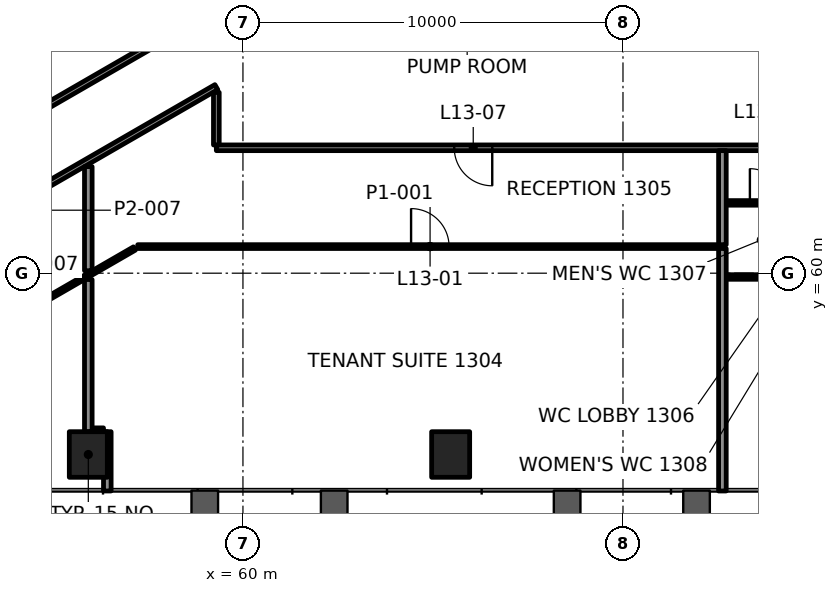
"""IFC4 building model, lengths in metres.
Left out: names, types, materials, properties, quantities, classifications, styles, units other than length and angle.
Written with IfcOpenShell. Run it as: python <this file> out.ifc"""

import sys

from ifc_helpers import new_model, si_unit, direction, frame, frame_2d, origin, origin_2d, place, context, subcontext, project, spatial, rectangle, extrude, element, fill, save


model = new_model("IFC4")
c1 = context("Model", 3, precision=1e-05, world=origin(), true_north=direction((0.0, 1.0)))
c2 = subcontext(c1, "Body", "Model", "MODEL_VIEW")
j1 = project(units=[si_unit("LENGTHUNIT", "METRE"), si_unit("PLANEANGLEUNIT", "RADIAN")], contexts=[c1])
p1 = place(None, origin())
s1 = spatial("IfcSite", under=j1, at=p1, CompositionType="ELEMENT")
p2 = place(p1, origin())
s2 = spatial("IfcBuilding", under=s1, at=p2, CompositionType="ELEMENT")
p3 = place(p2, frame((0.0, 0.0, 61.0)))
s3 = spatial("IfcBuildingStorey", under=s2, at=p3, CompositionType="ELEMENT", Elevation=61.0)
for number, where, z_axis, x_axis in (
    (1, (55.931, 55.229, -0.0), (0.0, 0.0, 1.0), (1.0, 0.0, 0.0)),
    (2, (65.466, 55.229, -0.0), (0.0, 0.0, 1.0), (1.0, 0.0, 0.0)),
):
    element("IfcColumn", number, at=place(p3, frame(where, z_axis=z_axis, x_axis=x_axis)), inside=s3, PredefinedType="COLUMN", context=c2, shape_type="SweptSolid", body=[
        extrude(rectangle(XDim=1.0, YDim=1.2, at=origin_2d()), origin(), (0.0, 0.0, 1.0), 4.2),
    ])
p4 = place(p3, frame((56.031, 55.829, 0.0), z_axis=(0.0, 0.0, 1.0), x_axis=(1.0, 0.0, 0.0)))
e3 = element("IfcWall", 3, at=p4, inside=s3, PredefinedType="PARTITIONING", context=c2, shape_type="SweptSolid", body=[
    extrude(rectangle(XDim=0.3, YDim=0.2, at=frame_2d((0.15, 0.0))), origin(), (0.0, 0.0, 1.0), 3.4),
])
p5 = place(p3, frame((72.717, 59.9, 0.0), z_axis=(0.0, 0.0, 1.0), x_axis=(1.0, 0.0, 0.0)))
e4 = element("IfcWall", 4, at=p5, inside=s3, PredefinedType="PARTITIONING", context=c2, shape_type="SweptSolid", body=[
    extrude(rectangle(XDim=7.05, YDim=0.12, at=frame_2d((3.525, 0.0))), origin(), (0.0, 0.0, 1.0), 3.4),
])
p6 = place(p3, frame((57.232, 60.7, 0.0), z_axis=(0.0, 0.0, 1.0), x_axis=(1.0, 0.0, 0.0)))
e5 = element("IfcWall", 5, at=p6, inside=s3, PredefinedType="PARTITIONING", context=c2, shape_type="SweptSolid", body=[
    extrude(rectangle(XDim=15.385, YDim=0.1, at=frame_2d((7.692, 0.0))), origin(), (0.0, 0.0, 1.0), 3.4),
])
p7 = place(p6, frame((7.192, 0.0, 0.0)))
e6 = element("IfcOpeningElement", 6, at=p7, cuts=e5, PredefinedType="OPENING", context=c2, shape_type="SweptSolid", body=[
    extrude(rectangle(XDim=1.0, YDim=2.1, at=frame_2d((0.5, 1.05))), frame((0.0, 0.06, 0.0), z_axis=(0.0, -1.0, 0.0), x_axis=(1.0, 0.0, 0.0)), (0.0, 0.0, 1.0), 0.12),
])
p8 = place(p3, frame((72.716, 61.85, 0.0), z_axis=(0.0, 0.0, 1.0), x_axis=(1.0, 0.0, 0.0)))
e7 = element("IfcWall", 7, at=p8, inside=s3, PredefinedType="PARTITIONING", context=c2, shape_type="SweptSolid", body=[
    extrude(rectangle(XDim=7.051, YDim=0.12, at=frame_2d((3.525, 0.0))), origin(), (0.0, 0.0, 1.0), 3.4),
])
p9 = place(p8, frame((0.623, 0.0, 0.0)))
e8 = element("IfcOpeningElement", 8, at=p9, cuts=e7, PredefinedType="OPENING", context=c2, shape_type="SweptSolid", body=[
    extrude(rectangle(XDim=0.9, YDim=2.1, at=frame_2d((0.45, 1.05))), frame((0.0, 0.07, 0.0), z_axis=(0.0, -1.0, 0.0), x_axis=(1.0, 0.0, 0.0)), (0.0, 0.0, 1.0), 0.14),
])
p10 = place(p8, frame((2.515, 0.0, 0.0)))
e9 = element("IfcOpeningElement", 9, at=p10, cuts=e7, PredefinedType="OPENING", context=c2, shape_type="SweptSolid", body=[
    extrude(rectangle(XDim=0.9, YDim=2.1, at=frame_2d((0.45, 1.05))), frame((0.0, 0.07, 0.0), z_axis=(0.0, -1.0, 0.0), x_axis=(1.0, 0.0, 0.0)), (0.0, 0.0, 1.0), 0.14),
])
p11 = place(p8, frame((4.917, 0.0, 0.0)))
e10 = element("IfcOpeningElement", 10, at=p11, cuts=e7, PredefinedType="OPENING", context=c2, shape_type="SweptSolid", body=[
    extrude(rectangle(XDim=1.0, YDim=2.1, at=frame_2d((0.5, 1.05))), frame((0.0, 0.07, 0.0), z_axis=(0.0, -1.0, 0.0), x_axis=(1.0, 0.0, 0.0)), (0.0, 0.0, 1.0), 0.14),
])
p12 = place(p3, frame((90.699, 63.3, 0.0), z_axis=(0.0, 0.0, 1.0), x_axis=(-1.0, 0.0, 0.0)))
e11 = element("IfcWall", 11, at=p12, inside=s3, PredefinedType="PARTITIONING", context=c2, shape_type="SweptSolid", body=[
    extrude(rectangle(XDim=31.399, YDim=0.15, at=frame_2d((15.7, 0.0))), origin(), (0.0, 0.0, 1.0), 3.4),
])
p13 = place(p12, frame((4.968, 0.0, 0.0)))
e12 = element("IfcOpeningElement", 12, at=p13, cuts=e11, PredefinedType="OPENING", context=c2, shape_type="SweptSolid", body=[
    extrude(rectangle(XDim=1.2, YDim=2.1, at=frame_2d((0.6, 1.05))), frame((0.0, 0.085, 0.0), z_axis=(0.0, -1.0, 0.0), x_axis=(1.0, 0.0, 0.0)), (0.0, 0.0, 1.0), 0.17),
])
p14 = place(p12, frame((13.908, 0.0, 0.0)))
e13 = element("IfcOpeningElement", 13, at=p14, cuts=e11, PredefinedType="OPENING", context=c2, shape_type="SweptSolid", body=[
    extrude(rectangle(XDim=1.2, YDim=2.1, at=frame_2d((0.6, 1.05))), frame((0.0, 0.085, 0.0), z_axis=(0.0, -1.0, 0.0), x_axis=(1.0, 0.0, 0.0)), (0.0, 0.0, 1.0), 0.17),
])
p15 = place(p12, frame((24.14, 0.0, 0.0)))
e14 = element("IfcOpeningElement", 14, at=p15, cuts=e11, PredefinedType="OPENING", context=c2, shape_type="SweptSolid", body=[
    extrude(rectangle(XDim=1.0, YDim=2.1, at=frame_2d((0.5, 1.05))), frame((0.0, 0.085, 0.0), z_axis=(0.0, -1.0, 0.0), x_axis=(1.0, 0.0, 0.0)), (0.0, 0.0, 1.0), 0.17),
])
p16 = place(p3, frame((50.819, 56.998, 0.0), z_axis=(0.0, 0.0, 1.0), x_axis=(0.866023631393, 0.50000306986, 0.0)))
e15 = element("IfcWall", 15, at=p16, inside=s3, PredefinedType="PARTITIONING", context=c2, shape_type="SweptSolid", body=[
    extrude(rectangle(XDim=7.305, YDim=0.1, at=frame_2d((3.653, 0.0))), origin(), (0.0, 0.0, 1.0), 3.4),
])
p17 = place(p16, frame((2.602, 0.0, 0.0)))
e16 = element("IfcOpeningElement", 16, at=p17, cuts=e15, PredefinedType="OPENING", context=c2, shape_type="SweptSolid", body=[
    extrude(rectangle(XDim=0.9, YDim=2.1, at=frame_2d((0.45, 1.05))), frame((0.0, 0.06, 0.0), z_axis=(0.0, -1.0, 0.0), x_axis=(1.0, 0.0, 0.0)), (0.0, 0.0, 1.0), 0.12),
])
p18 = place(p3, frame((59.3, 64.896, 0.0), z_axis=(0.0, 0.0, 1.0), x_axis=(-0.86602302899, -0.500004113243, 0.0)))
e17 = element("IfcWall", 17, at=p18, inside=s3, PredefinedType="PARTITIONING", context=c2, shape_type="SweptSolid", body=[
    extrude(rectangle(XDim=12.956, YDim=0.15, at=frame_2d((6.478, 0.0))), origin(), (0.0, 0.0, 1.0), 3.247),
])
p19 = place(p18, frame((7.821, 0.0, 0.0)))
e18 = element("IfcOpeningElement", 18, at=p19, cuts=e17, PredefinedType="OPENING", context=c2, shape_type="SweptSolid", body=[
    extrude(rectangle(XDim=1.0, YDim=2.1, at=frame_2d((0.5, 1.05))), frame((0.0, 0.085, 0.0), z_axis=(0.0, -1.0, 0.0), x_axis=(1.0, 0.0, 0.0)), (0.0, 0.0, 1.0), 0.17),
])
p20 = place(p3, frame((47.178, 59.976, 0.0), z_axis=(0.0, 0.0, 1.0), x_axis=(0.866019280802, 0.500010605167, 0.0)))
e19 = element("IfcWall", 19, at=p20, inside=s3, PredefinedType="PARTITIONING", context=c2, shape_type="SweptSolid", body=[
    extrude(rectangle(XDim=13.91, YDim=0.15, at=frame_2d((6.955, 0.0))), origin(), (0.0, 0.0, 1.0), 3.4),
])
p21 = place(p20, frame((6.455, 0.0, 0.0)))
e20 = element("IfcOpeningElement", 20, at=p21, cuts=e19, PredefinedType="OPENING", context=c2, shape_type="SweptSolid", body=[
    extrude(rectangle(XDim=1.0, YDim=2.1, at=frame_2d((0.5, 1.05))), frame((0.0, 0.085, 0.0), z_axis=(0.0, -1.0, 0.0), x_axis=(1.0, 0.0, 0.0)), (0.0, 0.0, 1.0), 0.17),
])
p22 = place(p3, frame((56.7, 68.476, 0.0), z_axis=(0.0, 0.0, 1.0), x_axis=(-0.866026152489, -0.499998703203, 0.0)))
e21 = element("IfcWall", 21, at=p22, inside=s3, PredefinedType="PARTITIONING", context=c2, shape_type="SweptSolid", body=[
    extrude(rectangle(XDim=15.096, YDim=0.1, at=frame_2d((7.548, 0.0))), origin(), (0.0, 0.0, 1.0), 3.4),
])
p23 = place(p22, frame((6.948, 0.0, 0.0)))
e22 = element("IfcOpeningElement", 22, at=p23, cuts=e21, PredefinedType="OPENING", context=c2, shape_type="SweptSolid", body=[
    extrude(rectangle(XDim=1.2, YDim=2.1, at=frame_2d((0.6, 1.05))), frame((0.0, 0.06, 0.0), z_axis=(0.0, -1.0, 0.0), x_axis=(1.0, 0.0, 0.0)), (0.0, 0.0, 1.0), 0.12),
])
p24 = place(p3, frame((72.616, 54.269, 0.0), z_axis=(0.0, 0.0, 1.0), x_axis=(0.0, 1.0, 0.0)))
e23 = element("IfcWall", 23, at=p24, inside=s3, PredefinedType="PARTITIONING", context=c2, shape_type="SweptSolid", body=[
    extrude(rectangle(XDim=6.381, YDim=0.2, at=frame_2d((3.19, 0.0))), origin(), (0.0, 0.0, 1.0), 3.165),
])
p25 = place(p3, frame((59.3, 63.375, 0.0), z_axis=(0.0, 0.0, 1.0), x_axis=(0.0, 1.0, 0.0)))
e24 = element("IfcWall", 24, at=p25, inside=s3, PredefinedType="PARTITIONING", context=c2, shape_type="SweptSolid", body=[
    extrude(rectangle(XDim=1.385, YDim=0.15, at=frame_2d((0.692, 0.0))), origin(), (0.0, 0.0, 1.0), 3.247),
])
p26 = place(p3, frame((56.431, 54.269, 0.0), z_axis=(0.0, 0.0, 1.0), x_axis=(0.0, 1.0, 0.0)))
e25 = element("IfcWall", 25, at=p26, inside=s3, PredefinedType="PARTITIONING", context=c2, shape_type="SweptSolid", body=[
    extrude(rectangle(XDim=1.56, YDim=0.2, at=frame_2d((0.78, 0.0))), origin(), (0.0, 0.0, 1.0), 3.165),
])
p27 = place(p3, frame((55.931, 55.829, 0.0), z_axis=(0.0, 0.0, 1.0), x_axis=(0.0, 1.0, 0.0)))
e26 = element("IfcWall", 26, at=p27, inside=s3, PredefinedType="PARTITIONING", context=c2, shape_type="SweptSolid", body=[
    extrude(rectangle(XDim=4.005, YDim=0.2, at=frame_2d((2.002, 0.0))), origin(), (0.0, 0.0, 1.0), 3.4),
])
p28 = place(p3, frame((72.616, 60.75, 0.0), z_axis=(0.0, 0.0, 1.0), x_axis=(0.0, 1.0, 0.0)))
e27 = element("IfcWall", 27, at=p28, inside=s3, PredefinedType="PARTITIONING", context=c2, shape_type="SweptSolid", body=[
    extrude(rectangle(XDim=2.475, YDim=0.2, at=frame_2d((1.238, 0.0))), origin(), (0.0, 0.0, 1.0), 3.4),
])
p29 = place(p3, frame((55.931, 60.065, 0.0), z_axis=(0.0, 0.0, 1.0), x_axis=(0.0, 1.0, 0.0)))
e28 = element("IfcWall", 28, at=p29, inside=s3, PredefinedType="PARTITIONING", context=c2, shape_type="SweptSolid", body=[
    extrude(rectangle(XDim=2.74, YDim=0.2, at=frame_2d((1.37, 0.0))), origin(), (0.0, 0.0, 1.0), 3.4),
])
p30 = place(p7, origin())
e29 = element("IfcDoor", 29, at=p30, inside=s3, OperationType="SINGLE_SWING_LEFT", PredefinedType="DOOR", context=c2, shape_type="SweptSolid", body=[
    extrude(rectangle(XDim=1.0, YDim=2.1, at=frame_2d((0.5, 1.05))), frame((0.0, 0.025, 0.0), z_axis=(0.0, -1.0, 0.0), x_axis=(1.0, 0.0, 0.0)), (0.0, 0.0, 1.0), 0.05),
])
fill(e6, e29)
p31 = place(p9, origin())
e30 = element("IfcDoor", 30, at=p31, inside=s3, OperationType="SINGLE_SWING_RIGHT", PredefinedType="DOOR", context=c2, shape_type="SweptSolid", body=[
    extrude(rectangle(XDim=0.9, YDim=2.1, at=frame_2d((0.45, 1.05))), frame((0.0, 0.025, 0.0), z_axis=(0.0, -1.0, 0.0), x_axis=(1.0, 0.0, 0.0)), (0.0, 0.0, 1.0), 0.05),
])
fill(e8, e30)
p32 = place(p15, origin())
e31 = element("IfcDoor", 31, at=p32, inside=s3, OperationType="SINGLE_SWING_LEFT", PredefinedType="DOOR", context=c2, shape_type="SweptSolid", body=[
    extrude(rectangle(XDim=1.0, YDim=2.1, at=frame_2d((0.5, 1.05))), frame((0.0, 0.025, 0.0), z_axis=(0.0, -1.0, 0.0), x_axis=(1.0, 0.0, 0.0)), (0.0, 0.0, 1.0), 0.05),
])
fill(e14, e31)
save(model, sys.argv[1])
